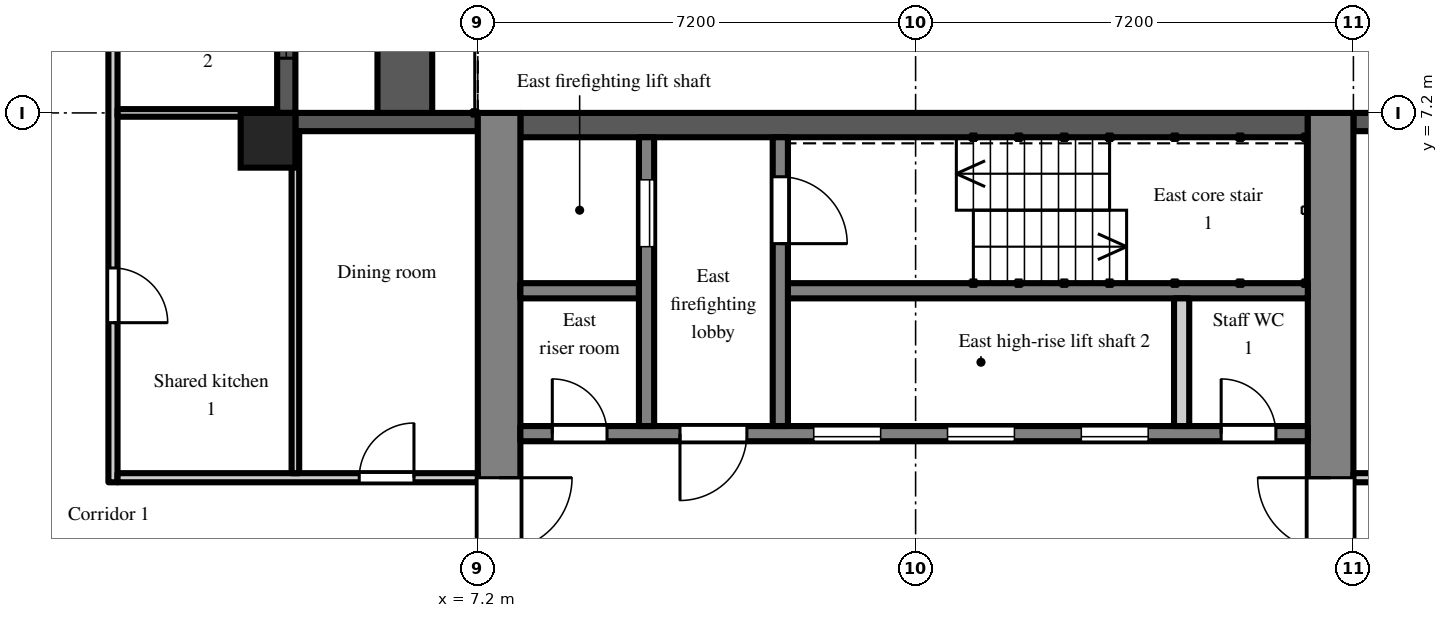
"""IFC4 building model, lengths in metres.
Left out: names, types, materials, properties, quantities, classifications, styles, units other than length and angle.
Written with IfcOpenShell. Run it as: python <this file> out.ifc"""

import sys

from ifc_helpers import new_model, si_unit, direction, frame, frame_2d, origin, origin_2d, place, context, subcontext, project, spatial, rectangle, extrude, element, fill, save


model = new_model("IFC4")
c1 = context("Model", 3, precision=1e-05, world=origin(), true_north=direction((0.0, 1.0)))
c2 = subcontext(c1, "Body", "Model", "MODEL_VIEW")
j1 = project(units=[si_unit("LENGTHUNIT", "METRE"), si_unit("PLANEANGLEUNIT", "RADIAN")], contexts=[c1])
p1 = place(None, origin())
s1 = spatial("IfcSite", under=j1, at=p1, CompositionType="ELEMENT")
p2 = place(p1, origin())
s2 = spatial("IfcBuilding", under=s1, at=p2, CompositionType="ELEMENT")
p3 = place(p2, frame((0.0, 0.0, 201.9)))
s3 = spatial("IfcBuildingStorey", under=s2, at=p3, CompositionType="ELEMENT", Elevation=201.9)
p4 = place(p3, frame((3.75, 6.75, 0.0), z_axis=(0.0, 0.0, 1.0), x_axis=(1.0, 0.0, 0.0)))
e1 = element("IfcColumn", 1, at=p4, inside=s3, PredefinedType="COLUMN", context=c2, shape_type="SweptSolid", body=[
    extrude(rectangle(XDim=0.9, YDim=0.9, at=origin_2d()), origin(), (0.0, 0.0, 1.0), 3.0),
])
p5 = place(p3, frame((24.3, 7.05, 0.0), z_axis=(0.0, 0.0, 1.0), x_axis=(-1.0, 0.0, 0.0)))
e2 = element("IfcWall", 2, at=p5, inside=s3, PredefinedType="SOLIDWALL", context=c2, shape_type="SweptSolid", body=[
    extrude(rectangle(XDim=2.7, YDim=0.3, at=frame_2d((1.35, 0.0))), origin(), (0.0, 0.0, 1.0), 2.3),
])
p6 = place(p3, frame((7.2, 7.05, 0.0), z_axis=(0.0, 0.0, 1.0), x_axis=(-1.0, 0.0, 0.0)))
e3 = element("IfcWall", 3, at=p6, inside=s3, PredefinedType="SOLIDWALL", context=c2, shape_type="SweptSolid", body=[
    extrude(rectangle(XDim=3.0, YDim=0.3, at=frame_2d((1.5, 0.0))), origin(), (0.0, 0.0, 1.0), 2.3),
])
p7 = place(p3, frame((4.05, 7.2, 0.0), z_axis=(0.0, 0.0, 1.0), x_axis=(0.0, 1.0, 0.0)))
e4 = element("IfcWall", 4, at=p7, inside=s3, PredefinedType="SOLIDWALL", context=c2, shape_type="SweptSolid", body=[
    extrude(rectangle(XDim=7.2, YDim=0.3, at=frame_2d((3.6, 0.0))), origin(), (0.0, 0.0, 1.0), 2.3),
])
p8 = place(p7, frame((3.0, 0.0, 0.0)))
e5 = element("IfcOpeningElement", 5, at=p8, cuts=e4, PredefinedType="OPENING", context=c2, shape_type="SweptSolid", body=[
    extrude(rectangle(XDim=1.2, YDim=2.05, at=frame_2d((0.6, 1.025))), frame((0.0, 0.16, 0.0), z_axis=(0.0, -1.0, 0.0), x_axis=(1.0, 0.0, 0.0)), (0.0, 0.0, 1.0), 0.32),
])
p9 = place(p7, frame((0.9, 0.0, 0.2)))
e6 = element("IfcOpeningElement", 6, at=p9, cuts=e4, PredefinedType="OPENING", context=c2, shape_type="SweptSolid", body=[
    extrude(rectangle(XDim=1.8, YDim=1.85, at=frame_2d((0.9, 0.925))), frame((0.0, 0.16, 0.0), z_axis=(0.0, -1.0, 0.0), x_axis=(1.0, 0.0, 0.0)), (0.0, 0.0, 1.0), 0.32),
])
p10 = place(p7, frame((4.5, 0.0, 0.2)))
e7 = element("IfcOpeningElement", 7, at=p10, cuts=e4, PredefinedType="OPENING", context=c2, shape_type="SweptSolid", body=[
    extrude(rectangle(XDim=1.8, YDim=1.85, at=frame_2d((0.9, 0.925))), frame((0.0, 0.16, 0.0), z_axis=(0.0, -1.0, 0.0), x_axis=(1.0, 0.0, 0.0)), (0.0, 0.0, 1.0), 0.32),
])
p11 = place(p3, frame((6.0, 7.2, 0.0), z_axis=(0.0, 0.0, 1.0), x_axis=(0.0, 1.0, 0.0)))
e8 = element("IfcWall", 8, at=p11, inside=s3, PredefinedType="PARAPET", context=c2, shape_type="SweptSolid", body=[
    extrude(rectangle(XDim=7.2, YDim=0.9, at=frame_2d((3.6, 0.0))), origin(), (0.0, 0.0, 1.0), 0.8),
])
p12 = place(p3, frame((7.55, -7.2, 0.0), z_axis=(0.0, 0.0, 1.0), x_axis=(0.0, 1.0, 0.0)))
e9 = element("IfcWall", 9, at=p12, inside=s3, PredefinedType="SHEAR", context=c2, shape_type="SweptSolid", body=[
    extrude(rectangle(XDim=14.4, YDim=0.7, at=frame_2d((7.2, 0.0))), origin(), (0.0, 0.0, 1.0), 2.6),
])
p13 = place(p12, frame((6.0, 0.0, 0.0)))
e10 = element("IfcOpeningElement", 10, at=p13, cuts=e9, PredefinedType="OPENING", context=c2, shape_type="SweptSolid", body=[
    extrude(rectangle(XDim=2.4, YDim=2.2, at=frame_2d((1.2, 1.1))), frame((0.0, 0.36, 0.0), z_axis=(0.0, -1.0, 0.0), x_axis=(1.0, 0.0, 0.0)), (0.0, 0.0, 1.0), 0.72),
])
p14 = place(p3, frame((21.225, -7.2, 0.0), z_axis=(0.0, 0.0, 1.0), x_axis=(0.0, 1.0, 0.0)))
e11 = element("IfcWall", 11, at=p14, inside=s3, PredefinedType="SHEAR", context=c2, shape_type="SweptSolid", body=[
    extrude(rectangle(XDim=14.4, YDim=0.75, at=frame_2d((7.2, 0.0))), origin(), (0.0, 0.0, 1.0), 2.6),
])
p15 = place(p14, frame((6.0, 0.0, 0.0)))
e12 = element("IfcOpeningElement", 12, at=p15, cuts=e11, PredefinedType="OPENING", context=c2, shape_type="SweptSolid", body=[
    extrude(rectangle(XDim=2.4, YDim=2.2, at=frame_2d((1.2, 1.1))), frame((0.0, 0.385, 0.0), z_axis=(0.0, -1.0, 0.0), x_axis=(1.0, 0.0, 0.0)), (0.0, 0.0, 1.0), 0.77),
])
p16 = place(p3, frame((7.9, 7.0, 0.0), z_axis=(0.0, 0.0, 1.0), x_axis=(1.0, 0.0, 0.0)))
e13 = element("IfcWall", 13, at=p16, inside=s3, PredefinedType="SHEAR", context=c2, shape_type="SweptSolid", body=[
    extrude(rectangle(XDim=12.95, YDim=0.4, at=frame_2d((6.475, 0.0))), origin(), (0.0, 0.0, 1.0), 2.6),
])
p17 = place(p3, frame((7.9, 1.925, 0.0), z_axis=(0.0, 0.0, 1.0), x_axis=(1.0, 0.0, 0.0)))
e14 = element("IfcWall", 14, at=p17, inside=s3, PredefinedType="SHEAR", context=c2, shape_type="SweptSolid", body=[
    extrude(rectangle(XDim=12.95, YDim=0.25, at=frame_2d((6.475, 0.0))), origin(), (0.0, 0.0, 1.0), 2.6),
])
p18 = place(p17, frame((4.825, 0.0, 0.0)))
e15 = element("IfcOpeningElement", 15, at=p18, cuts=e14, PredefinedType="OPENING", context=c2, shape_type="SweptSolid", body=[
    extrude(rectangle(XDim=1.1, YDim=2.1, at=frame_2d((0.55, 1.05))), frame((0.0, 0.135, 0.0), z_axis=(0.0, -1.0, 0.0), x_axis=(1.0, 0.0, 0.0)), (0.0, 0.0, 1.0), 0.27),
])
p19 = place(p17, frame((7.025, 0.0, 0.0)))
e16 = element("IfcOpeningElement", 16, at=p19, cuts=e14, PredefinedType="OPENING", context=c2, shape_type="SweptSolid", body=[
    extrude(rectangle(XDim=1.1, YDim=2.1, at=frame_2d((0.55, 1.05))), frame((0.0, 0.135, 0.0), z_axis=(0.0, -1.0, 0.0), x_axis=(1.0, 0.0, 0.0)), (0.0, 0.0, 1.0), 0.27),
])
p20 = place(p17, frame((9.225, 0.0, 0.0)))
e17 = element("IfcOpeningElement", 17, at=p20, cuts=e14, PredefinedType="OPENING", context=c2, shape_type="SweptSolid", body=[
    extrude(rectangle(XDim=1.1, YDim=2.1, at=frame_2d((0.55, 1.05))), frame((0.0, 0.135, 0.0), z_axis=(0.0, -1.0, 0.0), x_axis=(1.0, 0.0, 0.0)), (0.0, 0.0, 1.0), 0.27),
])
p21 = place(p17, frame((0.525, 0.0, 0.0)))
e18 = element("IfcOpeningElement", 18, at=p21, cuts=e14, PredefinedType="OPENING", context=c2, shape_type="SweptSolid", body=[
    extrude(rectangle(XDim=0.9, YDim=2.1, at=frame_2d((0.45, 1.05))), frame((0.0, 0.135, 0.0), z_axis=(0.0, -1.0, 0.0), x_axis=(1.0, 0.0, 0.0)), (0.0, 0.0, 1.0), 0.27),
])
p22 = place(p17, frame((2.625, 0.0, 0.0)))
e19 = element("IfcOpeningElement", 19, at=p22, cuts=e14, PredefinedType="OPENING", context=c2, shape_type="SweptSolid", body=[
    extrude(rectangle(XDim=1.1, YDim=2.1, at=frame_2d((0.55, 1.05))), frame((0.0, 0.135, 0.0), z_axis=(0.0, -1.0, 0.0), x_axis=(1.0, 0.0, 0.0)), (0.0, 0.0, 1.0), 0.27),
])
p23 = place(p17, frame((11.525, 0.0, 0.0)))
e20 = element("IfcOpeningElement", 20, at=p23, cuts=e14, PredefinedType="OPENING", context=c2, shape_type="SweptSolid", body=[
    extrude(rectangle(XDim=0.9, YDim=2.1, at=frame_2d((0.45, 1.05))), frame((0.0, 0.135, 0.0), z_axis=(0.0, -1.0, 0.0), x_axis=(1.0, 0.0, 0.0)), (0.0, 0.0, 1.0), 0.27),
])
p24 = place(p3, frame((7.9, 4.275, 0.0), z_axis=(0.0, 0.0, 1.0), x_axis=(1.0, 0.0, 0.0)))
e21 = element("IfcWall", 21, at=p24, inside=s3, PredefinedType="SHEAR", context=c2, shape_type="SweptSolid", body=[
    extrude(rectangle(XDim=1.95, YDim=0.25, at=frame_2d((0.975, 0.0))), origin(), (0.0, 0.0, 1.0), 2.6),
])
p25 = place(p3, frame((12.3, 4.275, 0.0), z_axis=(0.0, 0.0, 1.0), x_axis=(1.0, 0.0, 0.0)))
e22 = element("IfcWall", 22, at=p25, inside=s3, PredefinedType="SHEAR", context=c2, shape_type="SweptSolid", body=[
    extrude(rectangle(XDim=8.55, YDim=0.25, at=frame_2d((4.275, 0.0))), origin(), (0.0, 0.0, 1.0), 2.6),
])
p26 = place(p3, frame((9.975, 2.05, 0.0), z_axis=(0.0, 0.0, 1.0), x_axis=(0.0, 1.0, 0.0)))
e23 = element("IfcWall", 23, at=p26, inside=s3, PredefinedType="SHEAR", context=c2, shape_type="SweptSolid", body=[
    extrude(rectangle(XDim=4.75, YDim=0.25, at=frame_2d((2.375, 0.0))), origin(), (0.0, 0.0, 1.0), 2.6),
])
p27 = place(p26, frame((2.95, 0.0, 0.0)))
e24 = element("IfcOpeningElement", 24, at=p27, cuts=e23, PredefinedType="OPENING", context=c2, shape_type="SweptSolid", body=[
    extrude(rectangle(XDim=1.1, YDim=2.1, at=frame_2d((0.55, 1.05))), frame((0.0, 0.135, 0.0), z_axis=(0.0, -1.0, 0.0), x_axis=(1.0, 0.0, 0.0)), (0.0, 0.0, 1.0), 0.27),
])
p28 = place(p3, frame((12.175, 2.05, 0.0), z_axis=(0.0, 0.0, 1.0), x_axis=(0.0, 1.0, 0.0)))
e25 = element("IfcWall", 25, at=p28, inside=s3, PredefinedType="SHEAR", context=c2, shape_type="SweptSolid", body=[
    extrude(rectangle(XDim=4.75, YDim=0.25, at=frame_2d((2.375, 0.0))), origin(), (0.0, 0.0, 1.0), 2.6),
])
p29 = place(p28, frame((3.0, 0.0, 0.0)))
e26 = element("IfcOpeningElement", 26, at=p29, cuts=e25, PredefinedType="OPENING", context=c2, shape_type="SweptSolid", body=[
    extrude(rectangle(XDim=1.1, YDim=2.1, at=frame_2d((0.55, 1.05))), frame((0.0, 0.135, 0.0), z_axis=(0.0, -1.0, 0.0), x_axis=(1.0, 0.0, 0.0)), (0.0, 0.0, 1.0), 0.27),
])
p30 = place(p3, frame((18.775, 2.05, 0.0), z_axis=(0.0, 0.0, 1.0), x_axis=(0.0, 1.0, 0.0)))
e27 = element("IfcWall", 27, at=p30, inside=s3, PredefinedType="PARTITIONING", context=c2, shape_type="SweptSolid", body=[
    extrude(rectangle(XDim=2.1, YDim=0.25, at=frame_2d((1.05, 0.0))), origin(), (0.0, 0.0, 1.0), 2.6),
])
p31 = place(p3, frame((1.2, 1.125, 0.0), z_axis=(0.0, 0.0, 1.0), x_axis=(0.0, 1.0, 0.0)))
e28 = element("IfcWall", 28, at=p31, inside=s3, PredefinedType="PARTITIONING", context=c2, shape_type="SweptSolid", body=[
    extrude(rectangle(XDim=16.8, YDim=0.15, at=frame_2d((8.4, 0.0))), origin(), (0.0, 0.0, 1.0), 2.6),
])
p32 = place(p31, frame((2.625, 0.0, 0.0)))
e29 = element("IfcOpeningElement", 29, at=p32, cuts=e28, PredefinedType="OPENING", context=c2, shape_type="SweptSolid", body=[
    extrude(rectangle(XDim=0.9, YDim=2.1, at=frame_2d((0.45, 1.05))), frame((0.0, 0.085, 0.0), z_axis=(0.0, -1.0, 0.0), x_axis=(1.0, 0.0, 0.0)), (0.0, 0.0, 1.0), 0.17),
])
p33 = place(p31, frame((11.425, 0.0, 0.0)))
e30 = element("IfcOpeningElement", 30, at=p33, cuts=e28, PredefinedType="OPENING", context=c2, shape_type="SweptSolid", body=[
    extrude(rectangle(XDim=0.9, YDim=2.1, at=frame_2d((0.45, 1.05))), frame((0.0, 0.085, 0.0), z_axis=(0.0, -1.0, 0.0), x_axis=(1.0, 0.0, 0.0)), (0.0, 0.0, 1.0), 0.17),
])
p34 = place(p31, frame((7.825, 0.0, 0.0)))
e31 = element("IfcOpeningElement", 31, at=p34, cuts=e28, PredefinedType="OPENING", context=c2, shape_type="SweptSolid", body=[
    extrude(rectangle(XDim=0.9, YDim=2.1, at=frame_2d((0.45, 1.05))), frame((0.0, 0.085, 0.0), z_axis=(0.0, -1.0, 0.0), x_axis=(1.0, 0.0, 0.0)), (0.0, 0.0, 1.0), 0.17),
])
p35 = place(p31, frame((14.175, 0.0, 0.0)))
e32 = element("IfcOpeningElement", 32, at=p35, cuts=e28, PredefinedType="OPENING", context=c2, shape_type="SweptSolid", body=[
    extrude(rectangle(XDim=1.8, YDim=2.1, at=frame_2d((0.9, 1.05))), frame((0.0, 0.085, 0.0), z_axis=(0.0, -1.0, 0.0), x_axis=(1.0, 0.0, 0.0)), (0.0, 0.0, 1.0), 0.17),
])
p36 = place(p3, frame((1.275, 1.2, 0.0), z_axis=(0.0, 0.0, 1.0), x_axis=(1.0, 0.0, 0.0)))
e33 = element("IfcWall", 33, at=p36, inside=s3, PredefinedType="PARTITIONING", context=c2, shape_type="SweptSolid", body=[
    extrude(rectangle(XDim=5.925, YDim=0.15, at=frame_2d((2.962, 0.0))), origin(), (0.0, 0.0, 1.0), 2.6),
])
p37 = place(p36, frame((3.975, 0.0, 0.0)))
e34 = element("IfcOpeningElement", 34, at=p37, cuts=e33, PredefinedType="OPENING", context=c2, shape_type="SweptSolid", body=[
    extrude(rectangle(XDim=0.9, YDim=2.1, at=frame_2d((0.45, 1.05))), frame((0.0, 0.085, 0.0), z_axis=(0.0, -1.0, 0.0), x_axis=(1.0, 0.0, 0.0)), (0.0, 0.0, 1.0), 0.17),
])
p38 = place(p3, frame((1.275, 7.2, 0.0), z_axis=(0.0, 0.0, 1.0), x_axis=(1.0, 0.0, 0.0)))
e35 = element("IfcWall", 35, at=p38, inside=s3, PredefinedType="PARTITIONING", context=c2, shape_type="SweptSolid", body=[
    extrude(rectangle(XDim=2.625, YDim=0.125, at=frame_2d((1.312, 0.0))), origin(), (0.0, 0.0, 1.0), 2.6),
])
p39 = place(p3, frame((4.2, 1.275, 0.0), z_axis=(0.0, 0.0, 1.0), x_axis=(0.0, 1.0, 0.0)))
e36 = element("IfcWall", 36, at=p39, inside=s3, PredefinedType="PARTITIONING", context=c2, shape_type="SweptSolid", body=[
    extrude(rectangle(XDim=5.625, YDim=0.125, at=frame_2d((2.812, 0.0))), origin(), (0.0, 0.0, 1.0), 2.6),
])
p40 = place(p3, frame((21.6, 1.2, 0.0), z_axis=(0.0, 0.0, 1.0), x_axis=(1.0, 0.0, 0.0)))
e37 = element("IfcWall", 37, at=p40, inside=s3, PredefinedType="PARTITIONING", context=c2, shape_type="SweptSolid", body=[
    extrude(rectangle(XDim=3.525, YDim=0.15, at=frame_2d((1.762, 0.0))), origin(), (0.0, 0.0, 1.0), 2.6),
])
p41 = place(p40, frame((0.9, 0.0, 0.0)))
e38 = element("IfcOpeningElement", 38, at=p41, cuts=e37, PredefinedType="OPENING", context=c2, shape_type="SweptSolid", body=[
    extrude(rectangle(XDim=1.8, YDim=2.1, at=frame_2d((0.9, 1.05))), frame((0.0, 0.085, 0.0), z_axis=(0.0, -1.0, 0.0), x_axis=(1.0, 0.0, 0.0)), (0.0, 0.0, 1.0), 0.17),
])
p42 = place(p9, origin())
e39 = element("IfcWindow", 39, at=p42, inside=s3, PartitioningType="SINGLE_PANEL", PredefinedType="WINDOW", context=c2, shape_type="SweptSolid", body=[
    extrude(rectangle(XDim=1.8, YDim=1.85, at=frame_2d((0.9, 0.925))), frame((0.0, 0.03, 0.0), z_axis=(0.0, -1.0, 0.0), x_axis=(1.0, 0.0, 0.0)), (0.0, 0.0, 1.0), 0.06),
])
fill(e6, e39)
p43 = place(p18, origin())
e40 = element("IfcDoor", 40, at=p43, inside=s3, OperationType="SLIDING_TO_LEFT", PredefinedType="DOOR", context=c2, shape_type="SweptSolid", body=[
    extrude(rectangle(XDim=1.1, YDim=2.1, at=frame_2d((0.55, 1.05))), frame((0.0, 0.025, 0.0), z_axis=(0.0, -1.0, 0.0), x_axis=(1.0, 0.0, 0.0)), (0.0, 0.0, 1.0), 0.05),
])
fill(e15, e40)
p44 = place(p19, origin())
e41 = element("IfcDoor", 41, at=p44, inside=s3, OperationType="SLIDING_TO_LEFT", PredefinedType="DOOR", context=c2, shape_type="SweptSolid", body=[
    extrude(rectangle(XDim=1.1, YDim=2.1, at=frame_2d((0.55, 1.05))), frame((0.0, 0.025, 0.0), z_axis=(0.0, -1.0, 0.0), x_axis=(1.0, 0.0, 0.0)), (0.0, 0.0, 1.0), 0.05),
])
fill(e16, e41)
p45 = place(p20, origin())
e42 = element("IfcDoor", 42, at=p45, inside=s3, OperationType="SLIDING_TO_LEFT", PredefinedType="DOOR", context=c2, shape_type="SweptSolid", body=[
    extrude(rectangle(XDim=1.1, YDim=2.1, at=frame_2d((0.55, 1.05))), frame((0.0, 0.025, 0.0), z_axis=(0.0, -1.0, 0.0), x_axis=(1.0, 0.0, 0.0)), (0.0, 0.0, 1.0), 0.05),
])
fill(e17, e42)
p46 = place(p27, origin())
e43 = element("IfcDoor", 43, at=p46, inside=s3, OperationType="SLIDING_TO_LEFT", PredefinedType="DOOR", context=c2, shape_type="SweptSolid", body=[
    extrude(rectangle(XDim=1.1, YDim=2.1, at=frame_2d((0.55, 1.05))), frame((0.0, 0.025, 0.0), z_axis=(0.0, -1.0, 0.0), x_axis=(1.0, 0.0, 0.0)), (0.0, 0.0, 1.0), 0.05),
])
fill(e24, e43)
p47 = place(p29, frame((1.1, 0.0, 0.0), z_axis=(0.0, 0.0, 1.0), x_axis=(-1.0, 0.0, 0.0)))
e44 = element("IfcDoor", 44, at=p47, inside=s3, OperationType="SINGLE_SWING_RIGHT", PredefinedType="DOOR", context=c2, shape_type="SweptSolid", body=[
    extrude(rectangle(XDim=1.1, YDim=2.1, at=frame_2d((0.55, 1.05))), frame((0.0, 0.025, 0.0), z_axis=(0.0, -1.0, 0.0), x_axis=(1.0, 0.0, 0.0)), (0.0, 0.0, 1.0), 0.05),
])
fill(e26, e44)
p48 = place(p21, origin())
e45 = element("IfcDoor", 45, at=p48, inside=s3, OperationType="SINGLE_SWING_LEFT", PredefinedType="DOOR", context=c2, shape_type="SweptSolid", body=[
    extrude(rectangle(XDim=0.9, YDim=2.1, at=frame_2d((0.45, 1.05))), frame((0.0, 0.025, 0.0), z_axis=(0.0, -1.0, 0.0), x_axis=(1.0, 0.0, 0.0)), (0.0, 0.0, 1.0), 0.05),
])
fill(e18, e45)
p49 = place(p22, frame((1.1, 0.0, 0.0), z_axis=(0.0, 0.0, 1.0), x_axis=(-1.0, 0.0, 0.0)))
e46 = element("IfcDoor", 46, at=p49, inside=s3, OperationType="SINGLE_SWING_RIGHT", PredefinedType="DOOR", context=c2, shape_type="SweptSolid", body=[
    extrude(rectangle(XDim=1.1, YDim=2.1, at=frame_2d((0.55, 1.05))), frame((0.0, 0.025, 0.0), z_axis=(0.0, -1.0, 0.0), x_axis=(1.0, 0.0, 0.0)), (0.0, 0.0, 1.0), 0.05),
])
fill(e19, e46)
p50 = place(p13, frame((2.4, 0.0, 0.0), z_axis=(0.0, 0.0, 1.0), x_axis=(-1.0, 0.0, 0.0)))
e47 = element("IfcDoor", 47, at=p50, inside=s3, OperationType="DOUBLE_DOOR_DOUBLE_SWING", PredefinedType="DOOR", context=c2, shape_type="SweptSolid", body=[
    extrude(rectangle(XDim=2.4, YDim=2.2, at=frame_2d((1.2, 1.1))), frame((0.0, 0.025, 0.0), z_axis=(0.0, -1.0, 0.0), x_axis=(1.0, 0.0, 0.0)), (0.0, 0.0, 1.0), 0.05),
])
fill(e10, e47)
p51 = place(p15, origin())
e48 = element("IfcDoor", 48, at=p51, inside=s3, OperationType="DOUBLE_DOOR_DOUBLE_SWING", PredefinedType="DOOR", context=c2, shape_type="SweptSolid", body=[
    extrude(rectangle(XDim=2.4, YDim=2.2, at=frame_2d((1.2, 1.1))), frame((0.0, 0.025, 0.0), z_axis=(0.0, -1.0, 0.0), x_axis=(1.0, 0.0, 0.0)), (0.0, 0.0, 1.0), 0.05),
])
fill(e12, e48)
p52 = place(p23, origin())
e49 = element("IfcDoor", 49, at=p52, inside=s3, OperationType="SINGLE_SWING_LEFT", PredefinedType="DOOR", context=c2, shape_type="SweptSolid", body=[
    extrude(rectangle(XDim=0.9, YDim=2.1, at=frame_2d((0.45, 1.05))), frame((0.0, 0.025, 0.0), z_axis=(0.0, -1.0, 0.0), x_axis=(1.0, 0.0, 0.0)), (0.0, 0.0, 1.0), 0.05),
])
fill(e20, e49)
p53 = place(p32, frame((0.9, 0.0, 0.0), z_axis=(0.0, 0.0, 1.0), x_axis=(-1.0, 0.0, 0.0)))
e50 = element("IfcDoor", 50, at=p53, inside=s3, OperationType="SINGLE_SWING_RIGHT", PredefinedType="DOOR", context=c2, shape_type="SweptSolid", body=[
    extrude(rectangle(XDim=0.9, YDim=2.1, at=frame_2d((0.45, 1.05))), frame((0.0, 0.025, 0.0), z_axis=(0.0, -1.0, 0.0), x_axis=(1.0, 0.0, 0.0)), (0.0, 0.0, 1.0), 0.05),
])
fill(e29, e50)
p54 = place(p37, origin())
e51 = element("IfcDoor", 51, at=p54, inside=s3, OperationType="SINGLE_SWING_RIGHT", PredefinedType="DOOR", context=c2, shape_type="SweptSolid", body=[
    extrude(rectangle(XDim=0.9, YDim=2.1, at=frame_2d((0.45, 1.05))), frame((0.0, 0.025, 0.0), z_axis=(0.0, -1.0, 0.0), x_axis=(1.0, 0.0, 0.0)), (0.0, 0.0, 1.0), 0.05),
])
fill(e34, e51)
save(model, sys.argv[1])
